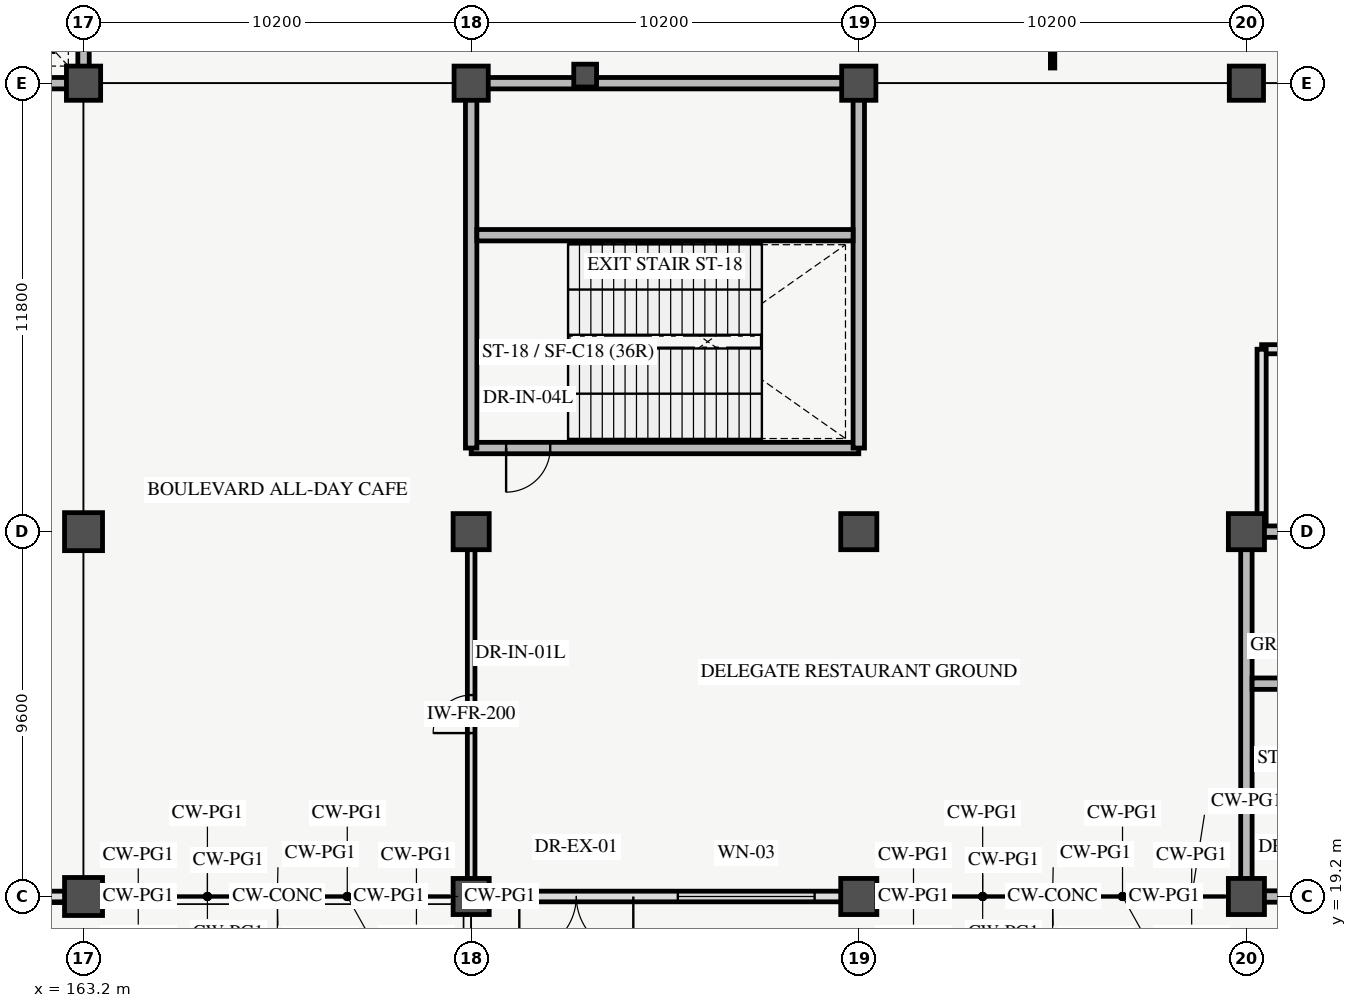
"""IFC4 building model, lengths in metres.
Left out: names, types, materials, properties, quantities, classifications, styles, units other than length and angle.
Written with IfcOpenShell. Run it as: python <this file> out.ifc"""

import sys

from ifc_helpers import new_model, si_unit, direction, frame, frame_2d, origin, origin_2d, place, context, subcontext, project, spatial, rectangle, circle, extrude, element, fill, save


model = new_model("IFC4")
c1 = context("Model", 3, precision=1e-05, world=origin(), true_north=direction((0.0, 1.0)))
c2 = subcontext(c1, "Body", "Model", "MODEL_VIEW")
j1 = project(units=[si_unit("LENGTHUNIT", "METRE"), si_unit("PLANEANGLEUNIT", "RADIAN")], contexts=[c1])
p1 = place(None, origin())
s1 = spatial("IfcSite", under=j1, at=p1, CompositionType="ELEMENT")
p2 = place(p1, origin())
s2 = spatial("IfcBuilding", under=s1, at=p2, CompositionType="ELEMENT")
p3 = place(p2, origin())
s3 = spatial("IfcBuildingStorey", under=s2, at=p3, CompositionType="ELEMENT", Elevation=0.0)
for number, where, z_axis, x_axis in (
    (1, (163.2, 19.2, 0.0), (0.0, 0.0, 1.0), (1.0, 0.0, 0.0)),
    (2, (163.2, 28.8, 0.0), (0.0, 0.0, 1.0), (1.0, 0.0, 0.0)),
):
    element("IfcColumn", number, at=place(p3, frame(where, z_axis=z_axis, x_axis=x_axis)), inside=s3, PredefinedType="COLUMN", context=c2, shape_type="SweptSolid", body=[
        extrude(circle(Radius=0.5, at=origin_2d()), origin(), (0.0, 0.0, 1.0), 5.4),
    ])
p4 = place(p3, frame((163.2, 40.6, 0.0), z_axis=(0.0, 0.0, 1.0), x_axis=(1.0, 0.0, 0.0)))
e3 = element("IfcColumn", 3, at=p4, inside=s3, PredefinedType="COLUMN", context=c2, shape_type="SweptSolid", body=[
    extrude(rectangle(XDim=0.9, YDim=0.9, at=origin_2d()), origin(), (0.0, 0.0, 1.0), 5.4),
])
for number, where, z_axis, x_axis in (
    (4, (173.4, 19.2, 0.0), (0.0, 0.0, 1.0), (1.0, 0.0, 0.0)),
    (5, (173.4, 28.8, 0.0), (0.0, 0.0, 1.0), (1.0, 0.0, 0.0)),
):
    element("IfcColumn", number, at=place(p3, frame(where, z_axis=z_axis, x_axis=x_axis)), inside=s3, PredefinedType="COLUMN", context=c2, shape_type="SweptSolid", body=[
        extrude(rectangle(XDim=0.95, YDim=0.95, at=origin_2d()), origin(), (0.0, 0.0, 1.0), 5.4),
    ])
p5 = place(p3, frame((173.4, 40.6, 0.0), z_axis=(0.0, 0.0, 1.0), x_axis=(1.0, 0.0, 0.0)))
e6 = element("IfcColumn", 6, at=p5, inside=s3, PredefinedType="COLUMN", context=c2, shape_type="SweptSolid", body=[
    extrude(rectangle(XDim=0.9, YDim=0.9, at=origin_2d()), origin(), (0.0, 0.0, 1.0), 5.4),
])
for number, where, z_axis, x_axis in (
    (7, (183.6, 19.2, 0.0), (0.0, 0.0, 1.0), (1.0, 0.0, 0.0)),
    (8, (183.6, 28.8, 0.0), (0.0, 0.0, 1.0), (1.0, 0.0, 0.0)),
):
    element("IfcColumn", number, at=place(p3, frame(where, z_axis=z_axis, x_axis=x_axis)), inside=s3, PredefinedType="COLUMN", context=c2, shape_type="SweptSolid", body=[
        extrude(rectangle(XDim=0.95, YDim=0.95, at=origin_2d()), origin(), (0.0, 0.0, 1.0), 5.4),
    ])
p6 = place(p3, frame((183.6, 40.6, 0.0), z_axis=(0.0, 0.0, 1.0), x_axis=(1.0, 0.0, 0.0)))
e9 = element("IfcColumn", 9, at=p6, inside=s3, PredefinedType="COLUMN", context=c2, shape_type="SweptSolid", body=[
    extrude(rectangle(XDim=0.9, YDim=0.9, at=origin_2d()), origin(), (0.0, 0.0, 1.0), 5.4),
])
for number, where, z_axis, x_axis in (
    (10, (193.8, 19.2, 0.0), (0.0, 0.0, 1.0), (1.0, 0.0, 0.0)),
    (11, (193.8, 28.8, 0.0), (0.0, 0.0, 1.0), (1.0, 0.0, 0.0)),
):
    element("IfcColumn", number, at=place(p3, frame(where, z_axis=z_axis, x_axis=x_axis)), inside=s3, PredefinedType="COLUMN", context=c2, shape_type="SweptSolid", body=[
        extrude(rectangle(XDim=0.95, YDim=0.95, at=origin_2d()), origin(), (0.0, 0.0, 1.0), 5.4),
    ])
p7 = place(p3, frame((193.8, 40.6, 0.0), z_axis=(0.0, 0.0, 1.0), x_axis=(1.0, 0.0, 0.0)))
e12 = element("IfcColumn", 12, at=p7, inside=s3, PredefinedType="COLUMN", context=c2, shape_type="SweptSolid", body=[
    extrude(rectangle(XDim=0.9, YDim=0.9, at=origin_2d()), origin(), (0.0, 0.0, 1.0), 5.4),
])
p8 = place(p3, frame((153.0, 40.6, 0.0), z_axis=(0.0, 0.0, 1.0), x_axis=(1.0, 0.0, 0.0)))
e13 = element("IfcWall", 13, at=p8, inside=s3, PredefinedType="SHEAR", context=c2, shape_type="SweptSolid", body=[
    extrude(rectangle(XDim=10.2, YDim=0.3, at=frame_2d((5.1, 0.0))), origin(), (0.0, 0.0, 1.0), 5.4),
])
p9 = place(p8, frame((7.4, 0.0, 0.0)))
e14 = element("IfcOpeningElement", 14, at=p9, cuts=e13, PredefinedType="OPENING", context=c2, shape_type="SweptSolid", body=[
    extrude(rectangle(XDim=1.2, YDim=2.25, at=frame_2d((0.6, 1.125))), frame((0.0, 0.16, 0.0), z_axis=(0.0, -1.0, 0.0), x_axis=(1.0, 0.0, 0.0)), (0.0, 0.0, 1.0), 0.32),
])
p10 = place(p3, frame((163.2, 40.6, 0.0), z_axis=(0.0, 0.0, 1.0), x_axis=(0.0, 1.0, 0.0)))
e15 = element("IfcWall", 15, at=p10, inside=s3, PredefinedType="SHEAR", context=c2, shape_type="SweptSolid", body=[
    extrude(rectangle(XDim=11.8, YDim=0.3, at=frame_2d((5.9, 0.0))), origin(), (0.0, 0.0, 1.0), 5.4),
])
p11 = place(p3, frame((193.8, 19.2, 0.0), z_axis=(0.0, 0.0, 1.0), x_axis=(1.0, 0.0, 0.0)))
e16 = element("IfcWall", 16, at=p11, inside=s3, PredefinedType="SHEAR", context=c2, shape_type="SweptSolid", body=[
    extrude(rectangle(XDim=10.2, YDim=0.3, at=frame_2d((5.1, 0.0))), origin(), (0.0, 0.0, 1.0), 5.4),
])
p12 = place(p11, frame((0.92, 0.0, 0.0)))
e17 = element("IfcOpeningElement", 17, at=p12, cuts=e16, PredefinedType="OPENING", context=c2, shape_type="SweptSolid", body=[
    extrude(rectangle(XDim=1.16, YDim=2.2, at=frame_2d((0.58, 1.1))), frame((0.0, 0.16, 0.0), z_axis=(0.0, -1.0, 0.0), x_axis=(1.0, 0.0, 0.0)), (0.0, 0.0, 1.0), 0.32),
])
p13 = place(p3, frame((193.8, 28.8, 0.0), z_axis=(0.0, 0.0, 1.0), x_axis=(1.0, 0.0, 0.0)))
e18 = element("IfcWall", 18, at=p13, inside=s3, PredefinedType="SHEAR", context=c2, shape_type="SweptSolid", body=[
    extrude(rectangle(XDim=10.2, YDim=0.3, at=frame_2d((5.1, 0.0))), origin(), (0.0, 0.0, 1.0), 5.4),
])
p14 = place(p13, frame((7.4, 0.0, 0.0)))
e19 = element("IfcOpeningElement", 19, at=p14, cuts=e18, PredefinedType="OPENING", context=c2, shape_type="SweptSolid", body=[
    extrude(rectangle(XDim=1.2, YDim=2.25, at=frame_2d((0.6, 1.125))), frame((0.0, 0.16, 0.0), z_axis=(0.0, -1.0, 0.0), x_axis=(1.0, 0.0, 0.0)), (0.0, 0.0, 1.0), 0.32),
])
p15 = place(p3, frame((193.8, 19.2, 0.0), z_axis=(0.0, 0.0, 1.0), x_axis=(0.0, 1.0, 0.0)))
e20 = element("IfcWall", 20, at=p15, inside=s3, PredefinedType="SHEAR", context=c2, shape_type="SweptSolid", body=[
    extrude(rectangle(XDim=9.6, YDim=0.3, at=frame_2d((4.8, 0.0))), origin(), (0.0, 0.0, 1.0), 5.4),
])
p16 = place(p3, frame((176.4, 40.8, 0.0), z_axis=(0.0, 0.0, 1.0), x_axis=(1.0, 0.0, 0.0)))
e21 = element("IfcColumn", 21, at=p16, inside=s3, PredefinedType="COLUMN", context=c2, shape_type="SweptSolid", body=[
    extrude(rectangle(XDim=0.6, YDim=0.6, at=origin_2d()), origin(), (0.0, 0.0, 1.0), 5.08),
])
p17 = place(p3, frame((153.24, 19.2, 0.0), z_axis=(0.0, 0.0, 1.0), x_axis=(1.0, 0.0, 0.0)))
e22 = element("IfcWall", 22, at=p17, inside=s3, PredefinedType="STANDARD", context=c2, shape_type="SweptSolid", body=[
    extrude(rectangle(XDim=9.72, YDim=0.28, at=frame_2d((4.86, 0.0))), origin(), (0.0, 0.0, 1.0), 3.68),
])
p18 = place(p17, frame((1.027, 0.0, 0.0)))
e23 = element("IfcOpeningElement", 23, at=p18, cuts=e22, PredefinedType="OPENING", context=c2, shape_type="SweptSolid", body=[
    extrude(rectangle(XDim=3.0, YDim=2.5, at=frame_2d((1.5, 1.25))), frame((0.0, 0.15, 0.0), z_axis=(0.0, -1.0, 0.0), x_axis=(1.0, 0.0, 0.0)), (0.0, 0.0, 1.0), 0.3),
])
p19 = place(p17, frame((5.198, 0.0, 0.85)))
e24 = element("IfcOpeningElement", 24, at=p19, cuts=e22, PredefinedType="OPENING", context=c2, shape_type="SweptSolid", body=[
    extrude(rectangle(XDim=3.6, YDim=2.1, at=frame_2d((1.8, 1.05))), frame((0.0, 0.15, 0.0), z_axis=(0.0, -1.0, 0.0), x_axis=(1.0, 0.0, 0.0)), (0.0, 0.0, 1.0), 0.3),
])
p20 = place(p3, frame((173.64, 19.2, 0.0), z_axis=(0.0, 0.0, 1.0), x_axis=(1.0, 0.0, 0.0)))
e25 = element("IfcWall", 25, at=p20, inside=s3, PredefinedType="STANDARD", context=c2, shape_type="SweptSolid", body=[
    extrude(rectangle(XDim=9.72, YDim=0.28, at=frame_2d((4.86, 0.0))), origin(), (0.0, 0.0, 1.0), 3.68),
])
p21 = place(p20, frame((1.027, 0.0, 0.0)))
e26 = element("IfcOpeningElement", 26, at=p21, cuts=e25, PredefinedType="OPENING", context=c2, shape_type="SweptSolid", body=[
    extrude(rectangle(XDim=3.0, YDim=2.5, at=frame_2d((1.5, 1.25))), frame((0.0, 0.15, 0.0), z_axis=(0.0, -1.0, 0.0), x_axis=(1.0, 0.0, 0.0)), (0.0, 0.0, 1.0), 0.3),
])
p22 = place(p20, frame((5.198, 0.0, 0.85)))
e27 = element("IfcOpeningElement", 27, at=p22, cuts=e25, PredefinedType="OPENING", context=c2, shape_type="SweptSolid", body=[
    extrude(rectangle(XDim=3.6, YDim=2.1, at=frame_2d((1.8, 1.05))), frame((0.0, 0.15, 0.0), z_axis=(0.0, -1.0, 0.0), x_axis=(1.0, 0.0, 0.0)), (0.0, 0.0, 1.0), 0.3),
])
p23 = place(p3, frame((193.95, 24.8, 0.0), z_axis=(0.0, 0.0, 1.0), x_axis=(1.0, 0.0, 0.0)))
e28 = element("IfcWall", 28, at=p23, inside=s3, PredefinedType="SHEAR", context=c2, shape_type="SweptSolid", body=[
    extrude(rectangle(XDim=9.9, YDim=0.3, at=frame_2d((4.95, 0.0))), origin(), (0.0, 0.0, 1.0), 5.4),
])
p24 = place(p3, frame((173.4, 31.0, 0.0), z_axis=(0.0, 0.0, 1.0), x_axis=(1.0, 0.0, 0.0)))
e29 = element("IfcWall", 29, at=p24, inside=s3, PredefinedType="SHEAR", context=c2, shape_type="SweptSolid", body=[
    extrude(rectangle(XDim=10.2, YDim=0.3, at=frame_2d((5.1, 0.0))), origin(), (0.0, 0.0, 1.0), 5.4),
])
p25 = place(p24, frame((0.92, 0.0, 0.0)))
e30 = element("IfcOpeningElement", 30, at=p25, cuts=e29, PredefinedType="OPENING", context=c2, shape_type="SweptSolid", body=[
    extrude(rectangle(XDim=1.16, YDim=2.2, at=frame_2d((0.58, 1.1))), frame((0.0, 0.16, 0.0), z_axis=(0.0, -1.0, 0.0), x_axis=(1.0, 0.0, 0.0)), (0.0, 0.0, 1.0), 0.32),
])
p26 = place(p3, frame((173.4, 40.6, 0.0), z_axis=(0.0, 0.0, 1.0), x_axis=(1.0, 0.0, 0.0)))
e31 = element("IfcWall", 31, at=p26, inside=s3, PredefinedType="SHEAR", context=c2, shape_type="SweptSolid", body=[
    extrude(rectangle(XDim=10.2, YDim=0.3, at=frame_2d((5.1, 0.0))), origin(), (0.0, 0.0, 1.0), 5.4),
])
for number, where, z_axis, x_axis in (
    (32, (173.4, 31.0, 0.0), (0.0, 0.0, 1.0), (0.0, 1.0, 0.0)),
    (33, (183.6, 31.0, 0.0), (0.0, 0.0, 1.0), (0.0, 1.0, 0.0)),
):
    element("IfcWall", number, at=place(p3, frame(where, z_axis=z_axis, x_axis=x_axis)), inside=s3, PredefinedType="SHEAR", context=c2, shape_type="SweptSolid", body=[
        extrude(rectangle(XDim=9.6, YDim=0.3, at=frame_2d((4.8, 0.0))), origin(), (0.0, 0.0, 1.0), 5.4),
    ])
p27 = place(p3, frame((173.55, 36.6, 0.0), z_axis=(0.0, 0.0, 1.0), x_axis=(1.0, 0.0, 0.0)))
e34 = element("IfcWall", 34, at=p27, inside=s3, PredefinedType="SHEAR", context=c2, shape_type="SweptSolid", body=[
    extrude(rectangle(XDim=9.9, YDim=0.3, at=frame_2d((4.95, 0.0))), origin(), (0.0, 0.0, 1.0), 5.4),
])
p28 = place(p3, frame((194.2, 33.6, 0.0), z_axis=(0.0, 0.0, 1.0), x_axis=(1.0, 0.0, 0.0)))
e35 = element("IfcWall", 35, at=p28, inside=s3, PredefinedType="PARTITIONING", context=c2, shape_type="SweptSolid", body=[
    extrude(rectangle(XDim=9.4, YDim=0.24, at=frame_2d((4.7, 0.0))), origin(), (0.0, 0.0, 1.0), 4.08),
])
p29 = place(p28, frame((3.75, 0.0, 0.0)))
e36 = element("IfcOpeningElement", 36, at=p29, cuts=e35, PredefinedType="OPENING", context=c2, shape_type="SweptSolid", body=[
    extrude(rectangle(XDim=1.9, YDim=2.25, at=frame_2d((0.95, 1.125))), frame((0.0, 0.13, 0.0), z_axis=(0.0, -1.0, 0.0), x_axis=(1.0, 0.0, 0.0)), (0.0, 0.0, 1.0), 0.26),
])
p30 = place(p3, frame((194.2, 29.0, 0.0), z_axis=(0.0, 0.0, 1.0), x_axis=(0.0, 1.0, 0.0)))
e37 = element("IfcWall", 37, at=p30, inside=s3, PredefinedType="PARTITIONING", context=c2, shape_type="SweptSolid", body=[
    extrude(rectangle(XDim=4.6, YDim=0.24, at=frame_2d((2.3, 0.0))), origin(), (0.0, 0.0, 1.0), 4.08),
])
p31 = place(p3, frame((188.7, 41.0, 0.0), z_axis=(0.0, 0.0, 1.0), x_axis=(0.0, 1.0, 0.0)))
e38 = element("IfcWall", 38, at=p31, inside=s3, PredefinedType="PARTITIONING", context=c2, shape_type="SweptSolid", body=[
    extrude(rectangle(XDim=11.0, YDim=0.115, at=frame_2d((5.5, 0.0))), origin(), (0.0, 0.0, 1.0), 4.08),
])
p32 = place(p31, frame((5.04, 0.0, 0.0)))
e39 = element("IfcOpeningElement", 39, at=p32, cuts=e38, PredefinedType="OPENING", context=c2, shape_type="SweptSolid", body=[
    extrude(rectangle(XDim=0.92, YDim=2.1, at=frame_2d((0.46, 1.05))), frame((0.0, 0.067, 0.0), z_axis=(0.0, -1.0, 0.0), x_axis=(1.0, 0.0, 0.0)), (0.0, 0.0, 1.0), 0.135),
])
p33 = place(p3, frame((173.4, 19.6, 0.0), z_axis=(0.0, 0.0, 1.0), x_axis=(0.0, 1.0, 0.0)))
e40 = element("IfcWall", 40, at=p33, inside=s3, PredefinedType="PARTITIONING", context=c2, shape_type="SweptSolid", body=[
    extrude(rectangle(XDim=8.8, YDim=0.2, at=frame_2d((4.4, 0.0))), origin(), (0.0, 0.0, 1.0), 4.08),
])
p34 = place(p33, frame((3.9, 0.0, 0.0)))
e41 = element("IfcOpeningElement", 41, at=p34, cuts=e40, PredefinedType="OPENING", context=c2, shape_type="SweptSolid", body=[
    extrude(rectangle(XDim=1.0, YDim=2.15, at=frame_2d((0.5, 1.075))), frame((0.0, 0.11, 0.0), z_axis=(0.0, -1.0, 0.0), x_axis=(1.0, 0.0, 0.0)), (0.0, 0.0, 1.0), 0.22),
])
p35 = place(p21, frame((3.0, 0.0, 0.0), z_axis=(0.0, 0.0, 1.0), x_axis=(-1.0, 0.0, 0.0)))
e42 = element("IfcDoor", 42, at=p35, inside=s3, OperationType="DOUBLE_DOOR_SINGLE_SWING", PredefinedType="DOOR", context=c2, shape_type="SweptSolid", body=[
    extrude(rectangle(XDim=3.0, YDim=2.5, at=frame_2d((1.5, 1.25))), frame((0.0, 0.025, 0.0), z_axis=(0.0, -1.0, 0.0), x_axis=(1.0, 0.0, 0.0)), (0.0, 0.0, 1.0), 0.05),
])
fill(e26, e42)
p36 = place(p22, origin())
e43 = element("IfcWindow", 43, at=p36, inside=s3, PartitioningType="TRIPLE_PANEL_VERTICAL", PredefinedType="WINDOW", context=c2, shape_type="SweptSolid", body=[
    extrude(rectangle(XDim=3.6, YDim=2.1, at=frame_2d((1.8, 1.05))), frame((0.0, 0.03, 0.0), z_axis=(0.0, -1.0, 0.0), x_axis=(1.0, 0.0, 0.0)), (0.0, 0.0, 1.0), 0.06),
])
fill(e27, e43)
p37 = place(p25, origin())
e44 = element("IfcDoor", 44, at=p37, inside=s3, OperationType="SINGLE_SWING_LEFT", PredefinedType="DOOR", context=c2, shape_type="SweptSolid", body=[
    extrude(rectangle(XDim=1.16, YDim=2.2, at=frame_2d((0.58, 1.1))), frame((0.0, 0.025, 0.0), z_axis=(0.0, -1.0, 0.0), x_axis=(1.0, 0.0, 0.0)), (0.0, 0.0, 1.0), 0.05),
])
fill(e30, e44)
p38 = place(p34, origin())
e45 = element("IfcDoor", 45, at=p38, inside=s3, OperationType="SINGLE_SWING_LEFT", PredefinedType="DOOR", context=c2, shape_type="SweptSolid", body=[
    extrude(rectangle(XDim=1.0, YDim=2.15, at=frame_2d((0.5, 1.075))), frame((0.0, 0.025, 0.0), z_axis=(0.0, -1.0, 0.0), x_axis=(1.0, 0.0, 0.0)), (0.0, 0.0, 1.0), 0.05),
])
fill(e41, e45)
save(model, sys.argv[1])
